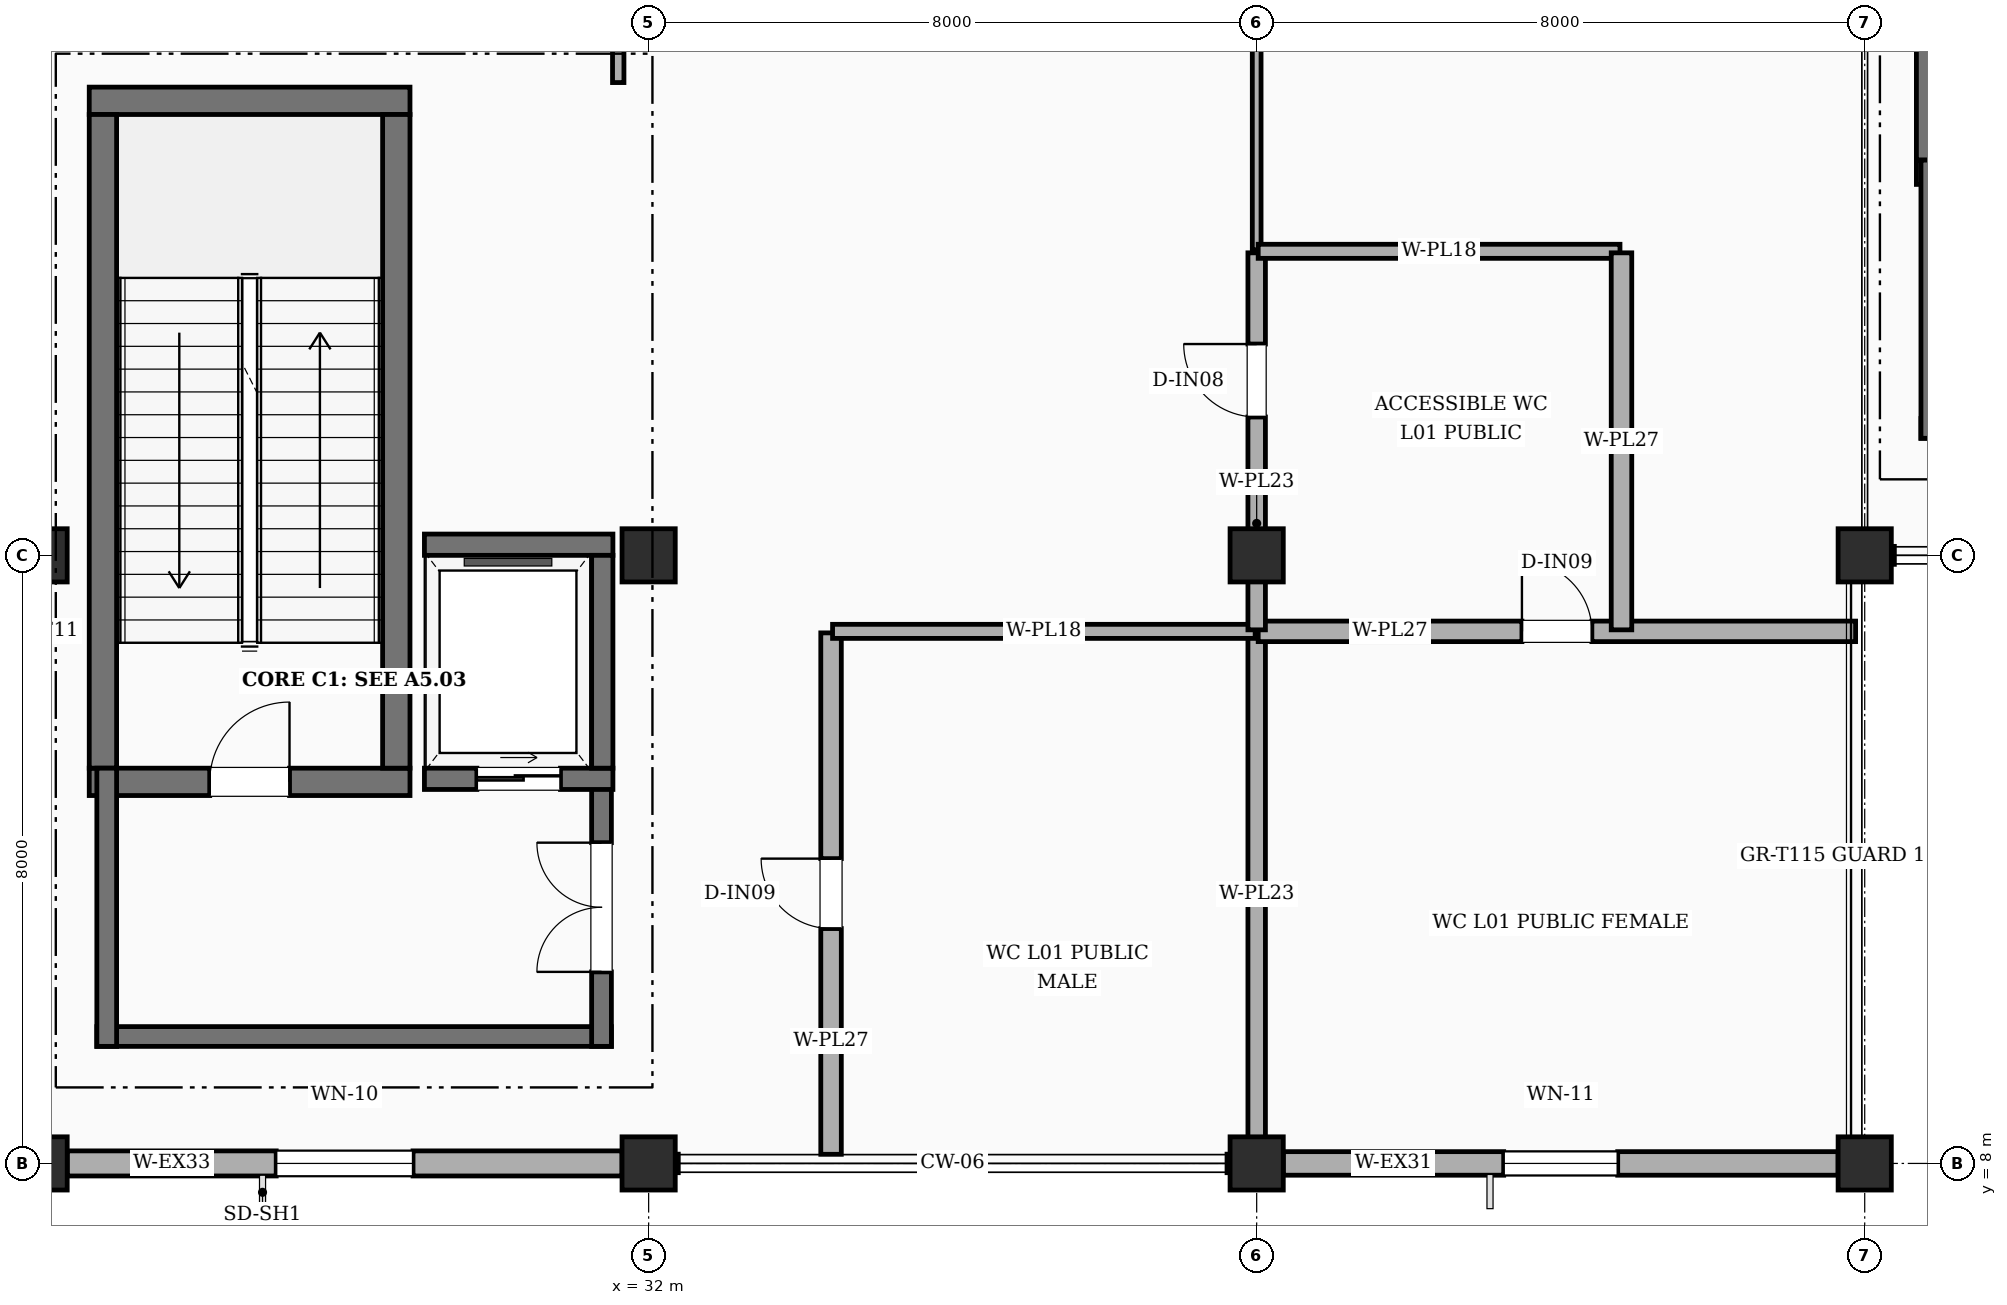
"""IFC4 building model, lengths in metres.
Left out: names, types, materials, properties, quantities, classifications, styles, units other than length and angle.
Written with IfcOpenShell. Run it as: python <this file> out.ifc"""

import sys

from ifc_helpers import new_model, si_unit, direction, frame, frame_2d, origin, origin_2d, place, context, subcontext, project, spatial, rectangle, extrude, element, fill, save


model = new_model("IFC4")
c1 = context("Model", 3, precision=1e-05, world=origin(), true_north=direction((0.0, 1.0)))
c2 = subcontext(c1, "Body", "Model", "MODEL_VIEW")
j1 = project(units=[si_unit("LENGTHUNIT", "METRE"), si_unit("PLANEANGLEUNIT", "RADIAN")], contexts=[c1])
p1 = place(None, origin())
s1 = spatial("IfcSite", under=j1, at=p1, CompositionType="ELEMENT")
p2 = place(p1, origin())
s2 = spatial("IfcBuilding", under=s1, at=p2, CompositionType="ELEMENT")
p3 = place(p2, frame((0.0, 0.0, 5.4)))
s3 = spatial("IfcBuildingStorey", under=s2, at=p3, CompositionType="ELEMENT", Elevation=5.4)
for number, where, z_axis, x_axis in (
    (1, (24.0, 8.0, 0.0), (0.0, 0.0, 1.0), (1.0, 0.0, 0.0)),
    (2, (24.0, 16.0, 0.0), (0.0, 0.0, 1.0), (1.0, 0.0, 0.0)),
    (3, (32.0, 8.0, 0.0), (0.0, 0.0, 1.0), (1.0, 0.0, 0.0)),
    (4, (32.0, 16.0, 0.0), (0.0, 0.0, 1.0), (1.0, 0.0, 0.0)),
    (5, (40.0, 8.0, 0.0), (0.0, 0.0, 1.0), (1.0, 0.0, 0.0)),
    (6, (40.0, 16.0, 0.0), (0.0, 0.0, 1.0), (1.0, 0.0, 0.0)),
    (7, (48.0, 8.0, 0.0), (0.0, 0.0, 1.0), (1.0, 0.0, 0.0)),
    (8, (48.0, 16.0, 0.0), (0.0, 0.0, 1.0), (1.0, 0.0, 0.0)),
):
    element("IfcColumn", number, at=place(p3, frame(where, z_axis=z_axis, x_axis=x_axis)), inside=s3, PredefinedType="COLUMN", context=c2, shape_type="SweptSolid", body=[
        extrude(rectangle(XDim=0.7, YDim=0.7, at=origin_2d()), origin(), (0.0, 0.0, 1.0), 5.4),
    ])
p4 = place(p3, frame((24.35, 8.0, 0.0), z_axis=(0.0, 0.0, 1.0), x_axis=(1.0, 0.0, 0.0)))
e9 = element("IfcWall", 9, at=p4, inside=s3, PredefinedType="STANDARD", context=c2, shape_type="SweptSolid", body=[
    extrude(rectangle(XDim=7.3, YDim=0.33, at=frame_2d((3.65, 0.0))), origin(), (0.0, 0.0, 1.0), 4.44),
])
p5 = place(p4, frame((2.75, 0.0, 0.95)))
e10 = element("IfcOpeningElement", 10, at=p5, cuts=e9, PredefinedType="OPENING", context=c2, shape_type="SweptSolid", body=[
    extrude(rectangle(XDim=1.8, YDim=2.0, at=frame_2d((0.9, 1.0))), frame((0.0, 0.175, 0.0), z_axis=(0.0, -1.0, 0.0), x_axis=(1.0, 0.0, 0.0)), (0.0, 0.0, 1.0), 0.35),
])
p6 = place(p3, frame((40.35, 8.0, 0.0), z_axis=(0.0, 0.0, 1.0), x_axis=(1.0, 0.0, 0.0)))
e11 = element("IfcWall", 11, at=p6, inside=s3, PredefinedType="STANDARD", context=c2, shape_type="SweptSolid", body=[
    extrude(rectangle(XDim=7.3, YDim=0.31, at=frame_2d((3.65, 0.0))), origin(), (0.0, 0.0, 1.0), 4.44),
])
p7 = place(p6, frame((2.9, 0.0, 0.95)))
e12 = element("IfcOpeningElement", 12, at=p7, cuts=e11, PredefinedType="OPENING", context=c2, shape_type="SweptSolid", body=[
    extrude(rectangle(XDim=1.5, YDim=1.8, at=frame_2d((0.75, 0.9))), frame((0.0, 0.165, 0.0), z_axis=(0.0, -1.0, 0.0), x_axis=(1.0, 0.0, 0.0)), (0.0, 0.0, 1.0), 0.33),
])
p8 = place(p3, frame((24.64, 13.02, 0.0), z_axis=(0.0, 0.0, 1.0), x_axis=(1.0, 0.0, 0.0)))
e13 = element("IfcWall", 13, at=p8, inside=s3, PredefinedType="SHEAR", context=c2, shape_type="SweptSolid", body=[
    extrude(rectangle(XDim=4.22, YDim=0.36, at=frame_2d((2.11, 0.0))), origin(), (0.0, 0.0, 1.0), 5.4),
])
p9 = place(p8, frame((1.585, 0.0, 0.0)))
e14 = element("IfcOpeningElement", 14, at=p9, cuts=e13, PredefinedType="OPENING", context=c2, shape_type="SweptSolid", body=[
    extrude(rectangle(XDim=1.05, YDim=2.15, at=frame_2d((0.525, 1.075))), frame((0.0, 0.19, 0.0), z_axis=(0.0, -1.0, 0.0), x_axis=(1.0, 0.0, 0.0)), (0.0, 0.0, 1.0), 0.38),
])
p10 = place(p3, frame((24.64, 21.98, 0.0), z_axis=(0.0, 0.0, 1.0), x_axis=(1.0, 0.0, 0.0)))
e15 = element("IfcWall", 15, at=p10, inside=s3, PredefinedType="SHEAR", context=c2, shape_type="SweptSolid", body=[
    extrude(rectangle(XDim=4.22, YDim=0.36, at=frame_2d((2.11, 0.0))), origin(), (0.0, 0.0, 1.0), 5.4),
])
for number, where, z_axis, x_axis in (
    (16, (24.82, 13.2, 0.0), (0.0, 0.0, 1.0), (0.0, 1.0, 0.0)),
    (17, (28.68, 13.2, 0.0), (0.0, 0.0, 1.0), (0.0, 1.0, 0.0)),
):
    element("IfcWall", number, at=place(p3, frame(where, z_axis=z_axis, x_axis=x_axis)), inside=s3, PredefinedType="SHEAR", context=c2, shape_type="SweptSolid", body=[
        extrude(rectangle(XDim=8.6, YDim=0.36, at=frame_2d((4.3, 0.0))), origin(), (0.0, 0.0, 1.0), 5.4),
    ])
p11 = place(p3, frame((31.51, 9.67, 0.0), z_axis=(0.0, 0.0, 1.0), x_axis=(-1.0, 0.0, 0.0)))
e18 = element("IfcWall", 18, at=p11, inside=s3, PredefinedType="SHEAR", context=c2, shape_type="SweptSolid", body=[
    extrude(rectangle(XDim=6.77, YDim=0.26, at=frame_2d((3.385, 0.0))), origin(), (0.0, 0.0, 1.0), 5.4),
])
p12 = place(p3, frame((24.87, 9.54, 0.0), z_axis=(0.0, 0.0, 1.0), x_axis=(0.0, 1.0, 0.0)))
e19 = element("IfcWall", 19, at=p12, inside=s3, PredefinedType="SHEAR", context=c2, shape_type="SweptSolid", body=[
    extrude(rectangle(XDim=3.66, YDim=0.26, at=frame_2d((1.83, 0.0))), origin(), (0.0, 0.0, 1.0), 5.4),
])
p13 = place(p3, frame((31.38, 9.54, 0.0), z_axis=(0.0, 0.0, 1.0), x_axis=(0.0, 1.0, 0.0)))
e20 = element("IfcWall", 20, at=p13, inside=s3, PredefinedType="SHEAR", context=c2, shape_type="SweptSolid", body=[
    extrude(rectangle(XDim=3.66, YDim=0.26, at=frame_2d((1.83, 0.0))), origin(), (0.0, 0.0, 1.0), 5.4),
])
p14 = place(p13, frame((0.98, 0.0, 0.0)))
e21 = element("IfcOpeningElement", 21, at=p14, cuts=e20, PredefinedType="OPENING", context=c2, shape_type="SweptSolid", body=[
    extrude(rectangle(XDim=1.7, YDim=2.2, at=frame_2d((0.85, 1.1))), frame((0.0, 0.14, 0.0), z_axis=(0.0, -1.0, 0.0), x_axis=(1.0, 0.0, 0.0)), (0.0, 0.0, 1.0), 0.28),
])
p15 = place(p3, frame((29.05, 13.06, 0.0), z_axis=(0.0, 0.0, 1.0), x_axis=(1.0, 0.0, 0.0)))
e22 = element("IfcWall", 22, at=p15, inside=s3, PredefinedType="SHEAR", context=c2, shape_type="SweptSolid", body=[
    extrude(rectangle(XDim=2.48, YDim=0.28, at=frame_2d((1.24, 0.0))), origin(), (0.0, 0.0, 1.0), 5.4),
])
p16 = place(p15, frame((0.69, 0.0, 0.0)))
e23 = element("IfcOpeningElement", 23, at=p16, cuts=e22, PredefinedType="OPENING", context=c2, shape_type="SweptSolid", body=[
    extrude(rectangle(XDim=1.1, YDim=2.15, at=frame_2d((0.55, 1.075))), frame((0.0, 0.15, 0.0), z_axis=(0.0, -1.0, 0.0), x_axis=(1.0, 0.0, 0.0)), (0.0, 0.0, 1.0), 0.3),
])
p17 = place(p3, frame((29.05, 16.14, 0.0), z_axis=(0.0, 0.0, 1.0), x_axis=(1.0, 0.0, 0.0)))
e24 = element("IfcWall", 24, at=p17, inside=s3, PredefinedType="SHEAR", context=c2, shape_type="SweptSolid", body=[
    extrude(rectangle(XDim=2.48, YDim=0.28, at=frame_2d((1.24, 0.0))), origin(), (0.0, 0.0, 1.0), 5.4),
])
p18 = place(p3, frame((31.39, 13.2, 0.0), z_axis=(0.0, 0.0, 1.0), x_axis=(0.0, 1.0, 0.0)))
e25 = element("IfcWall", 25, at=p18, inside=s3, PredefinedType="SHEAR", context=c2, shape_type="SweptSolid", body=[
    extrude(rectangle(XDim=2.8, YDim=0.28, at=frame_2d((1.4, 0.0))), origin(), (0.0, 0.0, 1.0), 5.4),
])
p19 = place(p3, frame((48.68, 21.04, 0.0), z_axis=(0.0, 0.0, 1.0), x_axis=(1.0, 0.0, 0.0)))
e26 = element("IfcWall", 26, at=p19, inside=s3, PredefinedType="SHEAR", context=c2, shape_type="SweptSolid", body=[
    extrude(rectangle(XDim=4.24, YDim=0.32, at=frame_2d((2.12, 0.0))), origin(), (0.0, 0.0, 1.0), 5.4),
])
p20 = place(p19, frame((1.595, 0.0, 0.0)))
e27 = element("IfcOpeningElement", 27, at=p20, cuts=e26, PredefinedType="OPENING", context=c2, shape_type="SweptSolid", body=[
    extrude(rectangle(XDim=1.05, YDim=2.15, at=frame_2d((0.525, 1.075))), frame((0.0, 0.17, 0.0), z_axis=(0.0, -1.0, 0.0), x_axis=(1.0, 0.0, 0.0)), (0.0, 0.0, 1.0), 0.34),
])
p21 = place(p3, frame((48.84, 21.2, 0.0), z_axis=(0.0, 0.0, 1.0), x_axis=(0.0, 1.0, 0.0)))
e28 = element("IfcWall", 28, at=p21, inside=s3, PredefinedType="SHEAR", context=c2, shape_type="SweptSolid", body=[
    extrude(rectangle(XDim=8.6, YDim=0.32, at=frame_2d((4.3, 0.0))), origin(), (0.0, 0.0, 1.0), 5.4),
])
p22 = place(p3, frame((55.56, 17.67, 0.0), z_axis=(0.0, 0.0, 1.0), x_axis=(-1.0, 0.0, 0.0)))
e29 = element("IfcWall", 29, at=p22, inside=s3, PredefinedType="SHEAR", context=c2, shape_type="SweptSolid", body=[
    extrude(rectangle(XDim=6.82, YDim=0.26, at=frame_2d((3.41, 0.0))), origin(), (0.0, 0.0, 1.0), 5.4),
])
p23 = place(p3, frame((48.87, 17.54, 0.0), z_axis=(0.0, 0.0, 1.0), x_axis=(0.0, 1.0, 0.0)))
e30 = element("IfcWall", 30, at=p23, inside=s3, PredefinedType="SHEAR", context=c2, shape_type="SweptSolid", body=[
    extrude(rectangle(XDim=3.66, YDim=0.26, at=frame_2d((1.83, 0.0))), origin(), (0.0, 0.0, 1.0), 5.4),
])
p24 = place(p3, frame((31.6, 22.22, 0.0), z_axis=(0.0, 0.0, 1.0), x_axis=(0.0, 1.0, 0.0)))
e31 = element("IfcWall", 31, at=p24, inside=s3, PredefinedType="PARTITIONING", context=c2, shape_type="SweptSolid", body=[
    extrude(rectangle(XDim=21.76, YDim=0.15, at=frame_2d((10.88, 0.0))), origin(), (0.0, 0.0, 1.0), 4.39),
])
p25 = place(p24, frame((12.468, 0.0, 0.0)))
e32 = element("IfcOpeningElement", 32, at=p25, cuts=e31, PredefinedType="OPENING", context=c2, shape_type="SweptSolid", body=[
    extrude(rectangle(XDim=1.65, YDim=2.25, at=frame_2d((0.825, 1.125))), frame((0.0, 0.085, 0.0), z_axis=(0.0, -1.0, 0.0), x_axis=(1.0, 0.0, 0.0)), (0.0, 0.0, 1.0), 0.17),
])
p26 = place(p3, frame((40.0, 20.02, 0.0), z_axis=(0.0, 0.0, 1.0), x_axis=(0.0, 1.0, 0.0)))
e33 = element("IfcWall", 33, at=p26, inside=s3, PredefinedType="PARTITIONING", context=c2, shape_type="SweptSolid", body=[
    extrude(rectangle(XDim=20.96, YDim=0.115, at=frame_2d((10.48, 0.0))), origin(), (0.0, 0.0, 1.0), 4.39),
])
p27 = place(p26, frame((7.414, 0.0, 0.0)))
e34 = element("IfcOpeningElement", 34, at=p27, cuts=e33, PredefinedType="OPENING", context=c2, shape_type="SweptSolid", body=[
    extrude(rectangle(XDim=1.45, YDim=2.2, at=frame_2d((0.725, 1.1))), frame((0.0, 0.067, 0.0), z_axis=(0.0, -1.0, 0.0), x_axis=(1.0, 0.0, 0.0)), (0.0, 0.0, 1.0), 0.135),
])
p28 = place(p3, frame((34.4, 8.12, 0.0), z_axis=(0.0, 0.0, 1.0), x_axis=(0.0, 1.0, 0.0)))
e35 = element("IfcWall", 35, at=p28, inside=s3, PredefinedType="PLUMBINGWALL", context=c2, shape_type="SweptSolid", body=[
    extrude(rectangle(XDim=6.86, YDim=0.27, at=frame_2d((3.43, 0.0))), origin(), (0.0, 0.0, 1.0), 4.44),
])
p29 = place(p28, frame((2.97, 0.0, 0.0)))
e36 = element("IfcOpeningElement", 36, at=p29, cuts=e35, PredefinedType="OPENING", context=c2, shape_type="SweptSolid", body=[
    extrude(rectangle(XDim=0.92, YDim=2.1, at=frame_2d((0.46, 1.05))), frame((0.0, 0.145, 0.0), z_axis=(0.0, -1.0, 0.0), x_axis=(1.0, 0.0, 0.0)), (0.0, 0.0, 1.0), 0.29),
])
p30 = place(p3, frame((40.0, 8.12, 0.0), z_axis=(0.0, 0.0, 1.0), x_axis=(0.0, 1.0, 0.0)))
e37 = element("IfcWall", 37, at=p30, inside=s3, PredefinedType="PLUMBINGWALL", context=c2, shape_type="SweptSolid", body=[
    extrude(rectangle(XDim=6.86, YDim=0.23, at=frame_2d((3.43, 0.0))), origin(), (0.0, 0.0, 1.0), 4.39),
])
p31 = place(p3, frame((34.42, 15.0, 0.0), z_axis=(0.0, 0.0, 1.0), x_axis=(1.0, 0.0, 0.0)))
e38 = element("IfcWall", 38, at=p31, inside=s3, PredefinedType="PLUMBINGWALL", context=c2, shape_type="SweptSolid", body=[
    extrude(rectangle(XDim=5.56, YDim=0.185, at=frame_2d((2.78, 0.0))), origin(), (0.0, 0.0, 1.0), 4.39),
])
p32 = place(p3, frame((40.02, 15.0, 0.0), z_axis=(0.0, 0.0, 1.0), x_axis=(1.0, 0.0, 0.0)))
e39 = element("IfcWall", 39, at=p32, inside=s3, PredefinedType="PLUMBINGWALL", context=c2, shape_type="SweptSolid", body=[
    extrude(rectangle(XDim=7.86, YDim=0.27, at=frame_2d((3.93, 0.0))), origin(), (0.0, 0.0, 1.0), 4.39),
])
p33 = place(p32, frame((3.47, 0.0, 0.0)))
e40 = element("IfcOpeningElement", 40, at=p33, cuts=e39, PredefinedType="OPENING", context=c2, shape_type="SweptSolid", body=[
    extrude(rectangle(XDim=0.92, YDim=2.1, at=frame_2d((0.46, 1.05))), frame((0.0, 0.145, 0.0), z_axis=(0.0, -1.0, 0.0), x_axis=(1.0, 0.0, 0.0)), (0.0, 0.0, 1.0), 0.29),
])
p34 = place(p3, frame((40.0, 15.02, 0.0), z_axis=(0.0, 0.0, 1.0), x_axis=(0.0, 1.0, 0.0)))
e41 = element("IfcWall", 41, at=p34, inside=s3, PredefinedType="PLUMBINGWALL", context=c2, shape_type="SweptSolid", body=[
    extrude(rectangle(XDim=4.96, YDim=0.23, at=frame_2d((2.48, 0.0))), origin(), (0.0, 0.0, 1.0), 4.39),
])
p35 = place(p34, frame((2.8, 0.0, 0.0)))
e42 = element("IfcOpeningElement", 42, at=p35, cuts=e41, PredefinedType="OPENING", context=c2, shape_type="SweptSolid", body=[
    extrude(rectangle(XDim=0.96, YDim=2.1, at=frame_2d((0.48, 1.05))), frame((0.0, 0.125, 0.0), z_axis=(0.0, -1.0, 0.0), x_axis=(1.0, 0.0, 0.0)), (0.0, 0.0, 1.0), 0.25),
])
p36 = place(p3, frame((40.02, 20.0, 0.0), z_axis=(0.0, 0.0, 1.0), x_axis=(1.0, 0.0, 0.0)))
e43 = element("IfcWall", 43, at=p36, inside=s3, PredefinedType="PLUMBINGWALL", context=c2, shape_type="SweptSolid", body=[
    extrude(rectangle(XDim=4.76, YDim=0.185, at=frame_2d((2.38, 0.0))), origin(), (0.0, 0.0, 1.0), 4.39),
])
p37 = place(p3, frame((44.8, 15.02, 0.0), z_axis=(0.0, 0.0, 1.0), x_axis=(0.0, 1.0, 0.0)))
e44 = element("IfcWall", 44, at=p37, inside=s3, PredefinedType="PLUMBINGWALL", context=c2, shape_type="SweptSolid", body=[
    extrude(rectangle(XDim=4.96, YDim=0.27, at=frame_2d((2.48, 0.0))), origin(), (0.0, 0.0, 1.0), 4.39),
])
p38 = place(p5, origin())
e45 = element("IfcWindow", 45, at=p38, inside=s3, PartitioningType="SINGLE_PANEL", PredefinedType="WINDOW", context=c2, shape_type="SweptSolid", body=[
    extrude(rectangle(XDim=1.8, YDim=2.0, at=frame_2d((0.9, 1.0))), frame((0.0, 0.03, 0.0), z_axis=(0.0, -1.0, 0.0), x_axis=(1.0, 0.0, 0.0)), (0.0, 0.0, 1.0), 0.06),
])
fill(e10, e45)
p39 = place(p7, origin())
e46 = element("IfcWindow", 46, at=p39, inside=s3, PartitioningType="SINGLE_PANEL", PredefinedType="WINDOW", context=c2, shape_type="SweptSolid", body=[
    extrude(rectangle(XDim=1.5, YDim=1.8, at=frame_2d((0.75, 0.9))), frame((0.0, 0.03, 0.0), z_axis=(0.0, -1.0, 0.0), x_axis=(1.0, 0.0, 0.0)), (0.0, 0.0, 1.0), 0.06),
])
fill(e12, e46)
p40 = place(p9, origin())
e47 = element("IfcDoor", 47, at=p40, inside=s3, OperationType="SINGLE_SWING_RIGHT", PredefinedType="DOOR", context=c2, shape_type="SweptSolid", body=[
    extrude(rectangle(XDim=1.05, YDim=2.15, at=frame_2d((0.525, 1.075))), frame((0.0, 0.025, 0.0), z_axis=(0.0, -1.0, 0.0), x_axis=(1.0, 0.0, 0.0)), (0.0, 0.0, 1.0), 0.05),
])
fill(e14, e47)
p41 = place(p14, origin())
e48 = element("IfcDoor", 48, at=p41, inside=s3, OperationType="DOUBLE_DOOR_SINGLE_SWING", PredefinedType="DOOR", context=c2, shape_type="SweptSolid", body=[
    extrude(rectangle(XDim=1.7, YDim=2.2, at=frame_2d((0.85, 1.1))), frame((0.0, 0.025, 0.0), z_axis=(0.0, -1.0, 0.0), x_axis=(1.0, 0.0, 0.0)), (0.0, 0.0, 1.0), 0.05),
])
fill(e21, e48)
p42 = place(p16, origin())
e49 = element("IfcDoor", 49, at=p42, inside=s3, OperationType="SLIDING_TO_LEFT", PredefinedType="DOOR", context=c2, shape_type="SweptSolid", body=[
    extrude(rectangle(XDim=1.1, YDim=2.15, at=frame_2d((0.55, 1.075))), frame((0.0, 0.025, 0.0), z_axis=(0.0, -1.0, 0.0), x_axis=(1.0, 0.0, 0.0)), (0.0, 0.0, 1.0), 0.05),
])
fill(e23, e49)
p43 = place(p29, origin())
e50 = element("IfcDoor", 50, at=p43, inside=s3, OperationType="SINGLE_SWING_RIGHT", PredefinedType="DOOR", context=c2, shape_type="SweptSolid", body=[
    extrude(rectangle(XDim=0.92, YDim=2.1, at=frame_2d((0.46, 1.05))), frame((0.0, 0.025, 0.0), z_axis=(0.0, -1.0, 0.0), x_axis=(1.0, 0.0, 0.0)), (0.0, 0.0, 1.0), 0.05),
])
fill(e36, e50)
p44 = place(p33, origin())
e51 = element("IfcDoor", 51, at=p44, inside=s3, OperationType="SINGLE_SWING_LEFT", PredefinedType="DOOR", context=c2, shape_type="SweptSolid", body=[
    extrude(rectangle(XDim=0.92, YDim=2.1, at=frame_2d((0.46, 1.05))), frame((0.0, 0.025, 0.0), z_axis=(0.0, -1.0, 0.0), x_axis=(1.0, 0.0, 0.0)), (0.0, 0.0, 1.0), 0.05),
])
fill(e40, e51)
p45 = place(p35, origin())
e52 = element("IfcDoor", 52, at=p45, inside=s3, OperationType="SINGLE_SWING_RIGHT", PredefinedType="DOOR", context=c2, shape_type="SweptSolid", body=[
    extrude(rectangle(XDim=0.96, YDim=2.1, at=frame_2d((0.48, 1.05))), frame((0.0, 0.025, 0.0), z_axis=(0.0, -1.0, 0.0), x_axis=(1.0, 0.0, 0.0)), (0.0, 0.0, 1.0), 0.05),
])
fill(e42, e52)
save(model, sys.argv[1])
